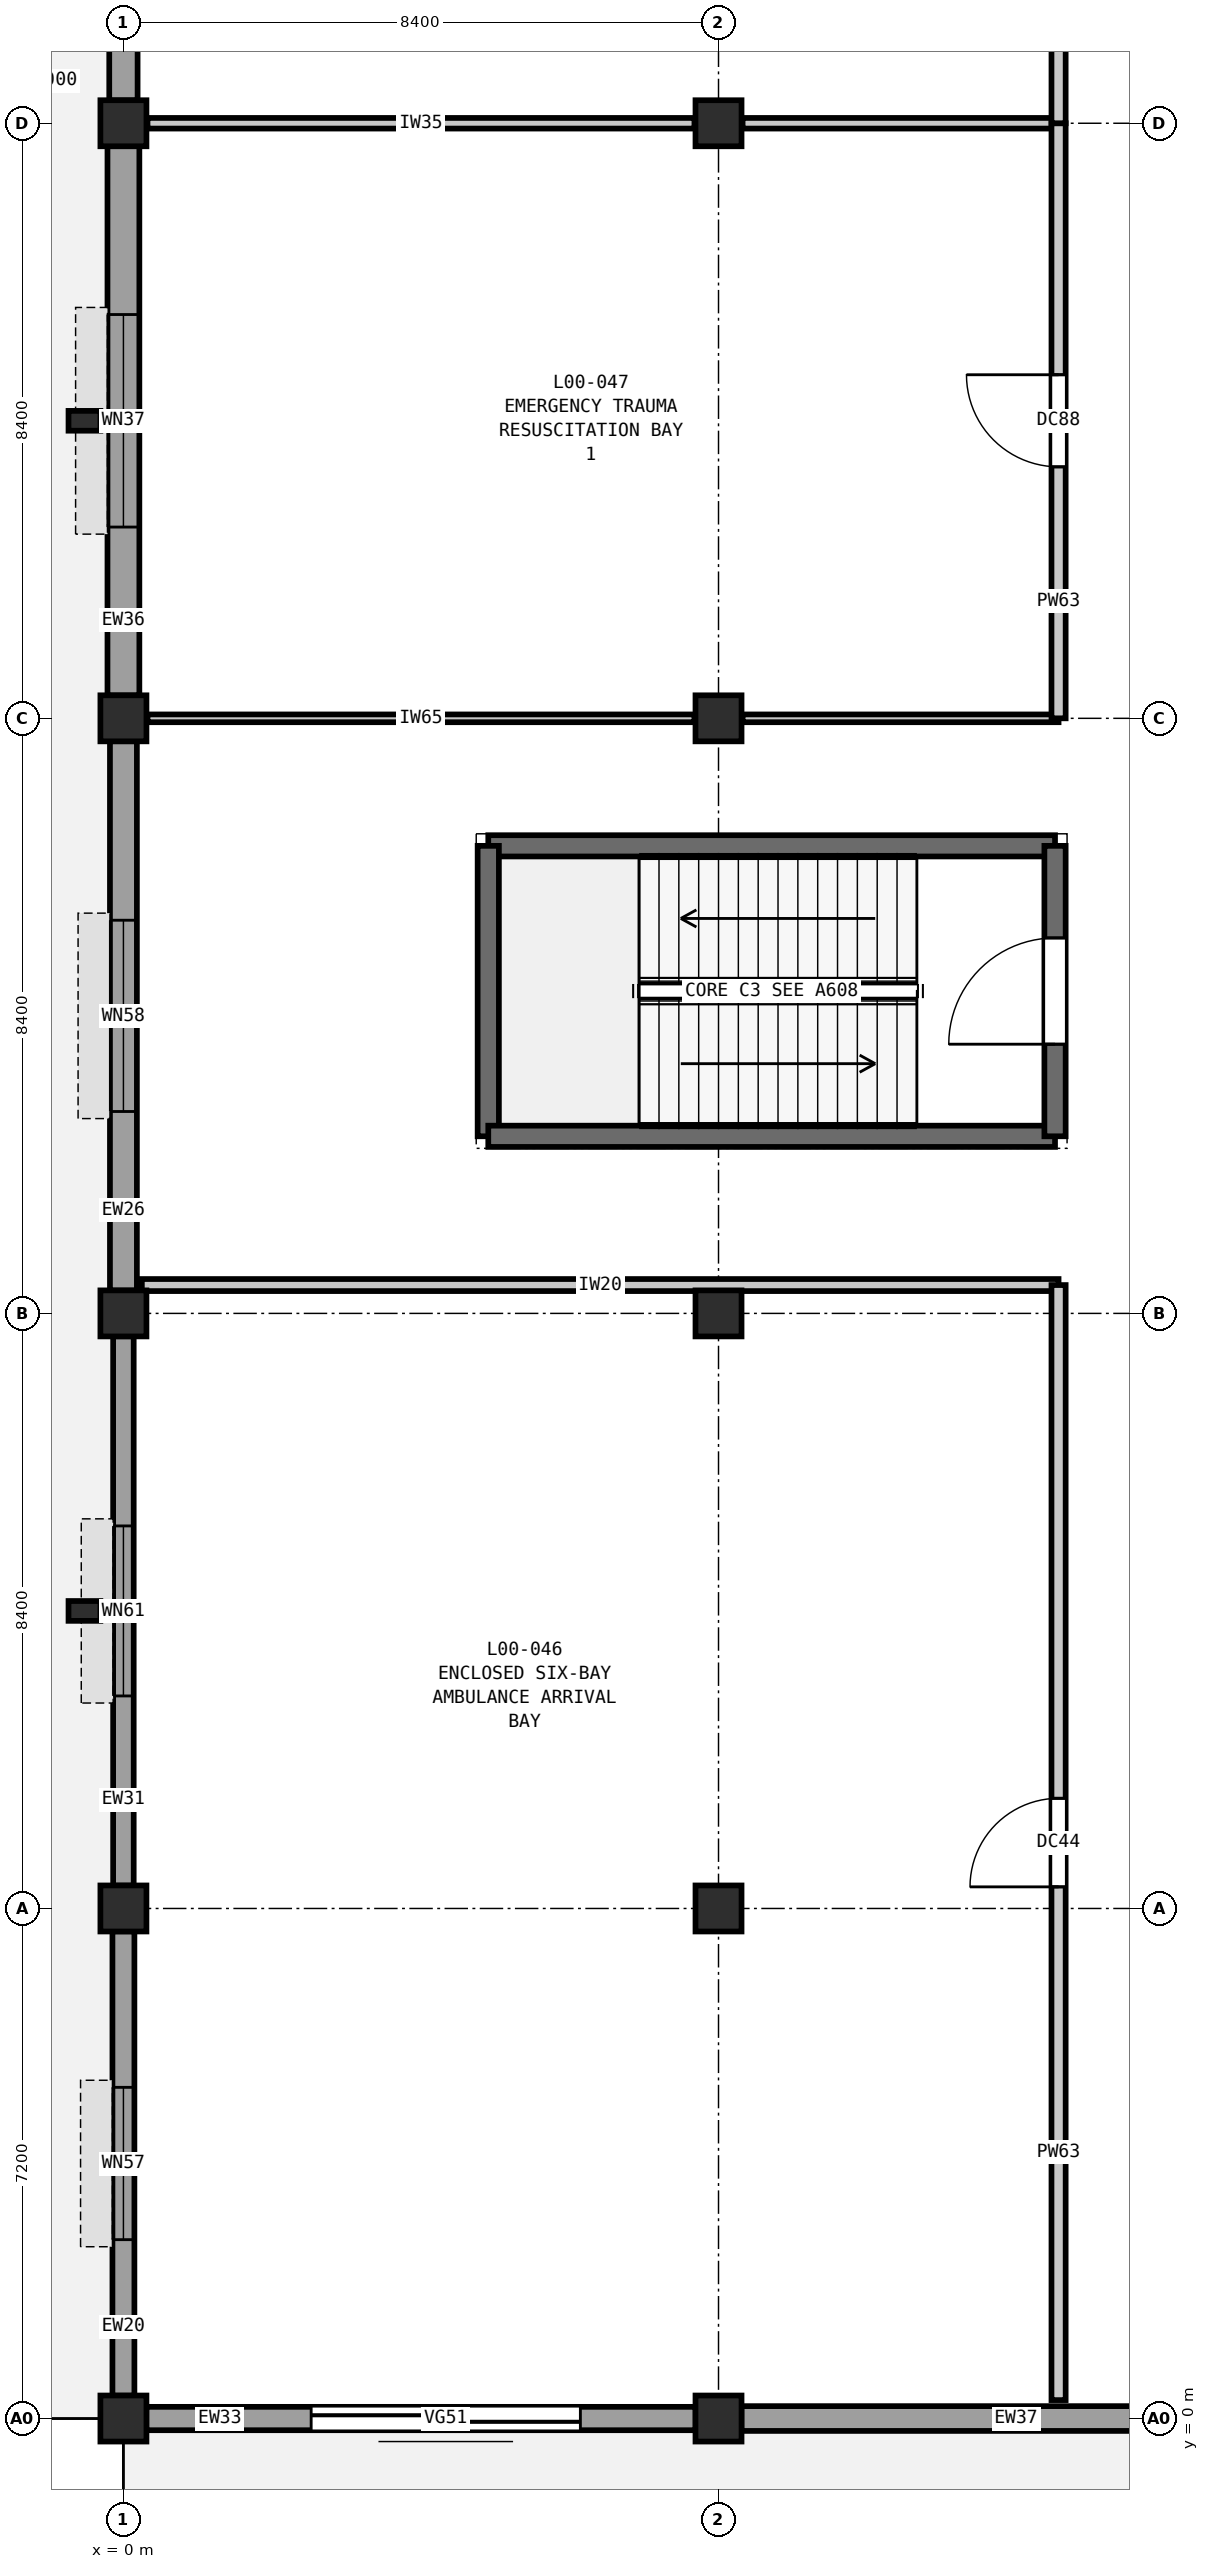
"""IFC4 building model, lengths in metres.
Left out: names, types, materials, properties, quantities, classifications, styles, units other than length and angle.
Written with IfcOpenShell. Run it as: python <this file> out.ifc"""

import sys

from ifc_helpers import new_model, si_unit, direction, frame, frame_2d, origin, origin_2d, place, context, subcontext, project, spatial, rectangle, extrude, element, fill, save


model = new_model("IFC4")
c1 = context("Model", 3, precision=1e-05, world=origin(), true_north=direction((0.0, 1.0)))
c2 = subcontext(c1, "Body", "Model", "MODEL_VIEW")
j1 = project(units=[si_unit("LENGTHUNIT", "METRE"), si_unit("PLANEANGLEUNIT", "RADIAN")], contexts=[c1])
p1 = place(None, origin())
s1 = spatial("IfcSite", under=j1, at=p1, CompositionType="ELEMENT")
p2 = place(p1, origin())
s2 = spatial("IfcBuilding", under=s1, at=p2, CompositionType="ELEMENT")
p3 = place(p2, origin())
s3 = spatial("IfcBuildingStorey", under=s2, at=p3, CompositionType="ELEMENT", Elevation=0.0)
for number, where, z_axis, x_axis in (
    (1, (0.0, 0.0, 0.0), (0.0, 0.0, 1.0), (1.0, 0.0, 0.0)),
    (2, (0.0, 7.2, 0.0), (0.0, 0.0, 1.0), (1.0, 0.0, 0.0)),
    (3, (0.0, 15.6, 0.0), (0.0, 0.0, 1.0), (1.0, 0.0, 0.0)),
    (4, (0.0, 24.0, 0.0), (0.0, 0.0, 1.0), (1.0, 0.0, 0.0)),
    (5, (0.0, 32.4, 0.0), (0.0, 0.0, 1.0), (1.0, 0.0, 0.0)),
    (6, (8.4, 0.0, 0.0), (0.0, 0.0, 1.0), (1.0, 0.0, 0.0)),
    (7, (8.4, 7.2, 0.0), (0.0, 0.0, 1.0), (1.0, 0.0, 0.0)),
    (8, (8.4, 15.6, 0.0), (0.0, 0.0, 1.0), (1.0, 0.0, 0.0)),
    (9, (8.4, 24.0, 0.0), (0.0, 0.0, 1.0), (1.0, 0.0, 0.0)),
    (10, (8.4, 32.4, 0.0), (0.0, 0.0, 1.0), (1.0, 0.0, 0.0)),
):
    element("IfcColumn", number, at=place(p3, frame(where, z_axis=z_axis, x_axis=x_axis)), inside=s3, PredefinedType="COLUMN", context=c2, shape_type="SweptSolid", body=[
        extrude(rectangle(XDim=0.65, YDim=0.65, at=origin_2d()), origin(), (0.0, 0.0, 1.0), 5.4),
    ])
for number, where, z_axis, x_axis in (
    (11, (-0.55, 11.4, 0.0), (0.0, 0.0, 1.0), (1.0, 0.0, 0.0)),
    (12, (-0.55, 28.2, 0.0), (0.0, 0.0, 1.0), (1.0, 0.0, 0.0)),
):
    element("IfcColumn", number, at=place(p3, frame(where, z_axis=z_axis, x_axis=x_axis)), inside=s3, PredefinedType="PILASTER", context=c2, shape_type="SweptSolid", body=[
        extrude(rectangle(XDim=0.45, YDim=0.28, at=origin_2d()), origin(), (0.0, 0.0, 1.0), 5.4),
    ])
p4 = place(p3, frame((16.477, 0.0, 0.0), z_axis=(0.0, 0.0, 1.0), x_axis=(-1.0, 0.0, 0.0)))
e13 = element("IfcWall", 13, at=p4, inside=s3, PredefinedType="SOLIDWALL", context=c2, shape_type="SweptSolid", body=[
    extrude(rectangle(XDim=7.754, YDim=0.35, at=frame_2d((3.877, 0.0))), origin(), (0.0, 0.0, 1.0), 4.68),
])
p5 = place(p3, frame((8.077, 0.0, 0.0), z_axis=(0.0, 0.0, 1.0), x_axis=(-1.0, 0.0, 0.0)))
e14 = element("IfcWall", 14, at=p5, inside=s3, PredefinedType="SOLIDWALL", context=c2, shape_type="SweptSolid", body=[
    extrude(rectangle(XDim=7.754, YDim=0.33, at=frame_2d((3.877, 0.0))), origin(), (0.0, 0.0, 1.0), 4.68),
])
p6 = place(p5, frame((1.627, 0.0, 0.0)))
e15 = element("IfcOpeningElement", 15, at=p6, cuts=e14, PredefinedType="OPENING", context=c2, shape_type="SweptSolid", body=[
    extrude(rectangle(XDim=3.8, YDim=3.2, at=frame_2d((1.9, 1.6))), frame((0.0, 0.175, 0.0), z_axis=(0.0, -1.0, 0.0), x_axis=(1.0, 0.0, 0.0)), (0.0, 0.0, 1.0), 0.35),
])
p7 = place(p3, frame((0.0, 0.323, 0.0), z_axis=(0.0, 0.0, 1.0), x_axis=(0.0, 1.0, 0.0)))
e16 = element("IfcWall", 16, at=p7, inside=s3, PredefinedType="SOLIDWALL", context=c2, shape_type="SweptSolid", body=[
    extrude(rectangle(XDim=6.554, YDim=0.31, at=frame_2d((3.277, 0.0))), origin(), (0.0, 0.0, 1.0), 4.68),
])
p8 = place(p7, frame((2.202, 0.0, 0.9)))
e17 = element("IfcOpeningElement", 17, at=p8, cuts=e16, PredefinedType="OPENING", context=c2, shape_type="SweptSolid", body=[
    extrude(rectangle(XDim=2.15, YDim=2.15, at=frame_2d((1.075, 1.075))), frame((0.0, 0.165, 0.0), z_axis=(0.0, -1.0, 0.0), x_axis=(1.0, 0.0, 0.0)), (0.0, 0.0, 1.0), 0.33),
])
p9 = place(p3, frame((0.0, 7.523, 0.0), z_axis=(0.0, 0.0, 1.0), x_axis=(0.0, 1.0, 0.0)))
e18 = element("IfcWall", 18, at=p9, inside=s3, PredefinedType="SOLIDWALL", context=c2, shape_type="SweptSolid", body=[
    extrude(rectangle(XDim=7.754, YDim=0.29, at=frame_2d((3.877, 0.0))), origin(), (0.0, 0.0, 1.0), 4.68),
])
p10 = place(p9, frame((2.677, 0.0, 0.9)))
e19 = element("IfcOpeningElement", 19, at=p10, cuts=e18, PredefinedType="OPENING", context=c2, shape_type="SweptSolid", body=[
    extrude(rectangle(XDim=2.4, YDim=2.15, at=frame_2d((1.2, 1.075))), frame((0.0, 0.155, 0.0), z_axis=(0.0, -1.0, 0.0), x_axis=(1.0, 0.0, 0.0)), (0.0, 0.0, 1.0), 0.31),
])
p11 = place(p3, frame((0.0, 15.923, 0.0), z_axis=(0.0, 0.0, 1.0), x_axis=(0.0, 1.0, 0.0)))
e20 = element("IfcWall", 20, at=p11, inside=s3, PredefinedType="SOLIDWALL", context=c2, shape_type="SweptSolid", body=[
    extrude(rectangle(XDim=7.754, YDim=0.38, at=frame_2d((3.877, 0.0))), origin(), (0.0, 0.0, 1.0), 4.68),
])
p12 = place(p11, frame((2.527, 0.0, 0.9)))
e21 = element("IfcOpeningElement", 21, at=p12, cuts=e20, PredefinedType="OPENING", context=c2, shape_type="SweptSolid", body=[
    extrude(rectangle(XDim=2.7, YDim=2.15, at=frame_2d((1.35, 1.075))), frame((0.0, 0.2, 0.0), z_axis=(0.0, -1.0, 0.0), x_axis=(1.0, 0.0, 0.0)), (0.0, 0.0, 1.0), 0.4),
])
p13 = place(p3, frame((0.0, 24.323, 0.0), z_axis=(0.0, 0.0, 1.0), x_axis=(0.0, 1.0, 0.0)))
e22 = element("IfcWall", 22, at=p13, inside=s3, PredefinedType="SOLIDWALL", context=c2, shape_type="SweptSolid", body=[
    extrude(rectangle(XDim=7.754, YDim=0.45, at=frame_2d((3.877, 0.0))), origin(), (0.0, 0.0, 1.0), 4.68),
])
p14 = place(p13, frame((2.377, 0.0, 0.9)))
e23 = element("IfcOpeningElement", 23, at=p14, cuts=e22, PredefinedType="OPENING", context=c2, shape_type="SweptSolid", body=[
    extrude(rectangle(XDim=3.0, YDim=2.15, at=frame_2d((1.5, 1.075))), frame((0.0, 0.235, 0.0), z_axis=(0.0, -1.0, 0.0), x_axis=(1.0, 0.0, 0.0)), (0.0, 0.0, 1.0), 0.47),
])
p15 = place(p3, frame((0.0, 32.723, 0.0), z_axis=(0.0, 0.0, 1.0), x_axis=(0.0, 1.0, 0.0)))
e24 = element("IfcWall", 24, at=p15, inside=s3, PredefinedType="SOLIDWALL", context=c2, shape_type="SweptSolid", body=[
    extrude(rectangle(XDim=7.754, YDim=0.4, at=frame_2d((3.877, 0.0))), origin(), (0.0, 0.0, 1.0), 4.68),
])
p16 = place(p15, frame((3.127, 0.0, 0.9)))
e25 = element("IfcOpeningElement", 25, at=p16, cuts=e24, PredefinedType="OPENING", context=c2, shape_type="SweptSolid", body=[
    extrude(rectangle(XDim=1.5, YDim=2.35, at=frame_2d((0.75, 1.175))), frame((0.0, 0.21, 0.0), z_axis=(0.0, -1.0, 0.0), x_axis=(1.0, 0.0, 0.0)), (0.0, 0.0, 1.0), 0.42),
])
p17 = place(p3, frame((13.15, 22.2, 0.0), z_axis=(0.0, 0.0, 1.0), x_axis=(-1.0, 0.0, 0.0)))
e26 = element("IfcWall", 26, at=p17, inside=s3, PredefinedType="SHEAR", context=c2, shape_type="SweptSolid", body=[
    extrude(rectangle(XDim=8.0, YDim=0.3, at=frame_2d((4.0, 0.0))), origin(), (0.0, 0.0, 1.0), 5.4),
])
p18 = place(p3, frame((5.15, 22.2, 0.0), z_axis=(0.0, 0.0, 1.0), x_axis=(0.0, -1.0, 0.0)))
e27 = element("IfcWall", 27, at=p18, inside=s3, PredefinedType="SHEAR", context=c2, shape_type="SweptSolid", body=[
    extrude(rectangle(XDim=4.1, YDim=0.3, at=frame_2d((2.05, 0.0))), origin(), (0.0, 0.0, 1.0), 5.4),
])
p19 = place(p3, frame((5.15, 18.1, 0.0), z_axis=(0.0, 0.0, 1.0), x_axis=(1.0, 0.0, 0.0)))
e28 = element("IfcWall", 28, at=p19, inside=s3, PredefinedType="SHEAR", context=c2, shape_type="SweptSolid", body=[
    extrude(rectangle(XDim=8.0, YDim=0.3, at=frame_2d((4.0, 0.0))), origin(), (0.0, 0.0, 1.0), 5.4),
])
p20 = place(p3, frame((13.15, 18.1, 0.0), z_axis=(0.0, 0.0, 1.0), x_axis=(0.0, 1.0, 0.0)))
e29 = element("IfcWall", 29, at=p20, inside=s3, PredefinedType="SHEAR", context=c2, shape_type="SweptSolid", body=[
    extrude(rectangle(XDim=4.1, YDim=0.3, at=frame_2d((2.05, 0.0))), origin(), (0.0, 0.0, 1.0), 5.4),
])
p21 = place(p20, frame((1.3, 0.0, 0.0)))
e30 = element("IfcOpeningElement", 30, at=p21, cuts=e29, PredefinedType="OPENING", context=c2, shape_type="SweptSolid", body=[
    extrude(rectangle(XDim=1.5, YDim=2.2, at=frame_2d((0.75, 1.1))), frame((0.0, 0.16, 0.0), z_axis=(0.0, -1.0, 0.0), x_axis=(1.0, 0.0, 0.0)), (0.0, 0.0, 1.0), 0.32),
])
p22 = place(p3, frame((0.26, 16.0, 0.0), z_axis=(0.0, 0.0, 1.0), x_axis=(1.0, 0.0, 0.0)))
e31 = element("IfcWall", 31, at=p22, inside=s3, PredefinedType="PARTITIONING", context=c2, shape_type="SweptSolid", body=[
    extrude(rectangle(XDim=12.94, YDim=0.17, at=frame_2d((6.47, 0.0))), origin(), (0.0, 0.0, 1.0), 5.04),
])
p23 = place(p3, frame((0.34, 24.0, 0.0), z_axis=(0.0, 0.0, 1.0), x_axis=(1.0, 0.0, 0.0)))
e32 = element("IfcWall", 32, at=p23, inside=s3, PredefinedType="PARTITIONING", context=c2, shape_type="SweptSolid", body=[
    extrude(rectangle(XDim=7.72, YDim=0.11, at=frame_2d((3.86, 0.0))), origin(), (0.0, 0.0, 1.0), 4.635),
])
p24 = place(p3, frame((8.74, 24.0, 0.0), z_axis=(0.0, 0.0, 1.0), x_axis=(1.0, 0.0, 0.0)))
e33 = element("IfcWall", 33, at=p24, inside=s3, PredefinedType="PARTITIONING", context=c2, shape_type="SweptSolid", body=[
    extrude(rectangle(XDim=4.46, YDim=0.11, at=frame_2d((2.23, 0.0))), origin(), (0.0, 0.0, 1.0), 4.635),
])
p25 = place(p3, frame((0.34, 32.4, 0.0), z_axis=(0.0, 0.0, 1.0), x_axis=(1.0, 0.0, 0.0)))
e34 = element("IfcWall", 34, at=p25, inside=s3, PredefinedType="PARTITIONING", context=c2, shape_type="SweptSolid", body=[
    extrude(rectangle(XDim=7.72, YDim=0.15, at=frame_2d((3.86, 0.0))), origin(), (0.0, 0.0, 1.0), 4.635),
])
p26 = place(p3, frame((8.74, 32.4, 0.0), z_axis=(0.0, 0.0, 1.0), x_axis=(1.0, 0.0, 0.0)))
e35 = element("IfcWall", 35, at=p26, inside=s3, PredefinedType="PARTITIONING", context=c2, shape_type="SweptSolid", body=[
    extrude(rectangle(XDim=4.46, YDim=0.15, at=frame_2d((2.23, 0.0))), origin(), (0.0, 0.0, 1.0), 4.635),
])
p27 = place(p3, frame((13.2, 0.26, 0.0), z_axis=(0.0, 0.0, 1.0), x_axis=(0.0, 1.0, 0.0)))
e36 = element("IfcWall", 36, at=p27, inside=s3, PredefinedType="PARTITIONING", context=c2, shape_type="SweptSolid", body=[
    extrude(rectangle(XDim=15.74, YDim=0.2, at=frame_2d((7.87, 0.0))), origin(), (0.0, 0.0, 1.0), 5.04),
])
p28 = place(p27, frame((7.245, 0.0, 0.0)))
e37 = element("IfcOpeningElement", 37, at=p28, cuts=e36, PredefinedType="OPENING", context=c2, shape_type="SweptSolid", body=[
    extrude(rectangle(XDim=1.25, YDim=2.15, at=frame_2d((0.625, 1.075))), frame((0.0, 0.11, 0.0), z_axis=(0.0, -1.0, 0.0), x_axis=(1.0, 0.0, 0.0)), (0.0, 0.0, 1.0), 0.22),
])
p29 = place(p3, frame((13.2, 24.0, 0.0), z_axis=(0.0, 0.0, 1.0), x_axis=(0.0, 1.0, 0.0)))
e38 = element("IfcWall", 38, at=p29, inside=s3, PredefinedType="PARTITIONING", context=c2, shape_type="SweptSolid", body=[
    extrude(rectangle(XDim=8.4, YDim=0.2, at=frame_2d((4.2, 0.0))), origin(), (0.0, 0.0, 1.0), 5.04),
])
p30 = place(p29, frame((3.55, 0.0, 0.0)))
e39 = element("IfcOpeningElement", 39, at=p30, cuts=e38, PredefinedType="OPENING", context=c2, shape_type="SweptSolid", body=[
    extrude(rectangle(XDim=1.3, YDim=2.2, at=frame_2d((0.65, 1.1))), frame((0.0, 0.11, 0.0), z_axis=(0.0, -1.0, 0.0), x_axis=(1.0, 0.0, 0.0)), (0.0, 0.0, 1.0), 0.22),
])
p31 = place(p3, frame((13.2, 32.4, 0.0), z_axis=(0.0, 0.0, 1.0), x_axis=(0.0, 1.0, 0.0)))
e40 = element("IfcWall", 40, at=p31, inside=s3, PredefinedType="PARTITIONING", context=c2, shape_type="SweptSolid", body=[
    extrude(rectangle(XDim=8.4, YDim=0.2, at=frame_2d((4.2, 0.0))), origin(), (0.0, 0.0, 1.0), 5.04),
])
p32 = place(p31, frame((3.525, 0.0, 0.0)))
e41 = element("IfcOpeningElement", 41, at=p32, cuts=e40, PredefinedType="OPENING", context=c2, shape_type="SweptSolid", body=[
    extrude(rectangle(XDim=1.35, YDim=2.2, at=frame_2d((0.675, 1.1))), frame((0.0, 0.11, 0.0), z_axis=(0.0, -1.0, 0.0), x_axis=(1.0, 0.0, 0.0)), (0.0, 0.0, 1.0), 0.22),
])
p33 = place(p6, origin())
e42 = element("IfcDoor", 42, at=p33, inside=s3, OperationType="DOUBLE_DOOR_SLIDING", PredefinedType="GATE", context=c2, shape_type="SweptSolid", body=[
    extrude(rectangle(XDim=3.8, YDim=3.2, at=frame_2d((1.9, 1.6))), frame((0.0, 0.025, 0.0), z_axis=(0.0, -1.0, 0.0), x_axis=(1.0, 0.0, 0.0)), (0.0, 0.0, 1.0), 0.05),
])
fill(e15, e42)
p34 = place(p8, origin())
e43 = element("IfcWindow", 43, at=p34, inside=s3, PartitioningType="DOUBLE_PANEL_VERTICAL", PredefinedType="WINDOW", context=c2, shape_type="SweptSolid", body=[
    extrude(rectangle(XDim=2.15, YDim=2.15, at=frame_2d((1.075, 1.075))), frame((0.0, 0.03, 0.0), z_axis=(0.0, -1.0, 0.0), x_axis=(1.0, 0.0, 0.0)), (0.0, 0.0, 1.0), 0.06),
])
fill(e17, e43)
p35 = place(p10, origin())
e44 = element("IfcWindow", 44, at=p35, inside=s3, PartitioningType="DOUBLE_PANEL_VERTICAL", PredefinedType="WINDOW", context=c2, shape_type="SweptSolid", body=[
    extrude(rectangle(XDim=2.4, YDim=2.15, at=frame_2d((1.2, 1.075))), frame((0.0, 0.03, 0.0), z_axis=(0.0, -1.0, 0.0), x_axis=(1.0, 0.0, 0.0)), (0.0, 0.0, 1.0), 0.06),
])
fill(e19, e44)
p36 = place(p12, origin())
e45 = element("IfcWindow", 45, at=p36, inside=s3, PartitioningType="DOUBLE_PANEL_VERTICAL", PredefinedType="WINDOW", context=c2, shape_type="SweptSolid", body=[
    extrude(rectangle(XDim=2.7, YDim=2.15, at=frame_2d((1.35, 1.075))), frame((0.0, 0.03, 0.0), z_axis=(0.0, -1.0, 0.0), x_axis=(1.0, 0.0, 0.0)), (0.0, 0.0, 1.0), 0.06),
])
fill(e21, e45)
p37 = place(p14, origin())
e46 = element("IfcWindow", 46, at=p37, inside=s3, PartitioningType="DOUBLE_PANEL_VERTICAL", PredefinedType="WINDOW", context=c2, shape_type="SweptSolid", body=[
    extrude(rectangle(XDim=3.0, YDim=2.15, at=frame_2d((1.5, 1.075))), frame((0.0, 0.03, 0.0), z_axis=(0.0, -1.0, 0.0), x_axis=(1.0, 0.0, 0.0)), (0.0, 0.0, 1.0), 0.06),
])
fill(e23, e46)
p38 = place(p21, origin())
e47 = element("IfcDoor", 47, at=p38, inside=s3, OperationType="SINGLE_SWING_LEFT", PredefinedType="DOOR", context=c2, shape_type="SweptSolid", body=[
    extrude(rectangle(XDim=1.5, YDim=2.2, at=frame_2d((0.75, 1.1))), frame((0.0, 0.025, 0.0), z_axis=(0.0, -1.0, 0.0), x_axis=(1.0, 0.0, 0.0)), (0.0, 0.0, 1.0), 0.05),
])
fill(e30, e47)
p39 = place(p28, origin())
e48 = element("IfcDoor", 48, at=p39, inside=s3, OperationType="SINGLE_SWING_LEFT", PredefinedType="DOOR", context=c2, shape_type="SweptSolid", body=[
    extrude(rectangle(XDim=1.25, YDim=2.15, at=frame_2d((0.625, 1.075))), frame((0.0, 0.025, 0.0), z_axis=(0.0, -1.0, 0.0), x_axis=(1.0, 0.0, 0.0)), (0.0, 0.0, 1.0), 0.05),
])
fill(e37, e48)
p40 = place(p30, origin())
e49 = element("IfcDoor", 49, at=p40, inside=s3, OperationType="SINGLE_SWING_RIGHT", PredefinedType="DOOR", context=c2, shape_type="SweptSolid", body=[
    extrude(rectangle(XDim=1.3, YDim=2.2, at=frame_2d((0.65, 1.1))), frame((0.0, 0.025, 0.0), z_axis=(0.0, -1.0, 0.0), x_axis=(1.0, 0.0, 0.0)), (0.0, 0.0, 1.0), 0.05),
])
fill(e39, e49)
save(model, sys.argv[1])
